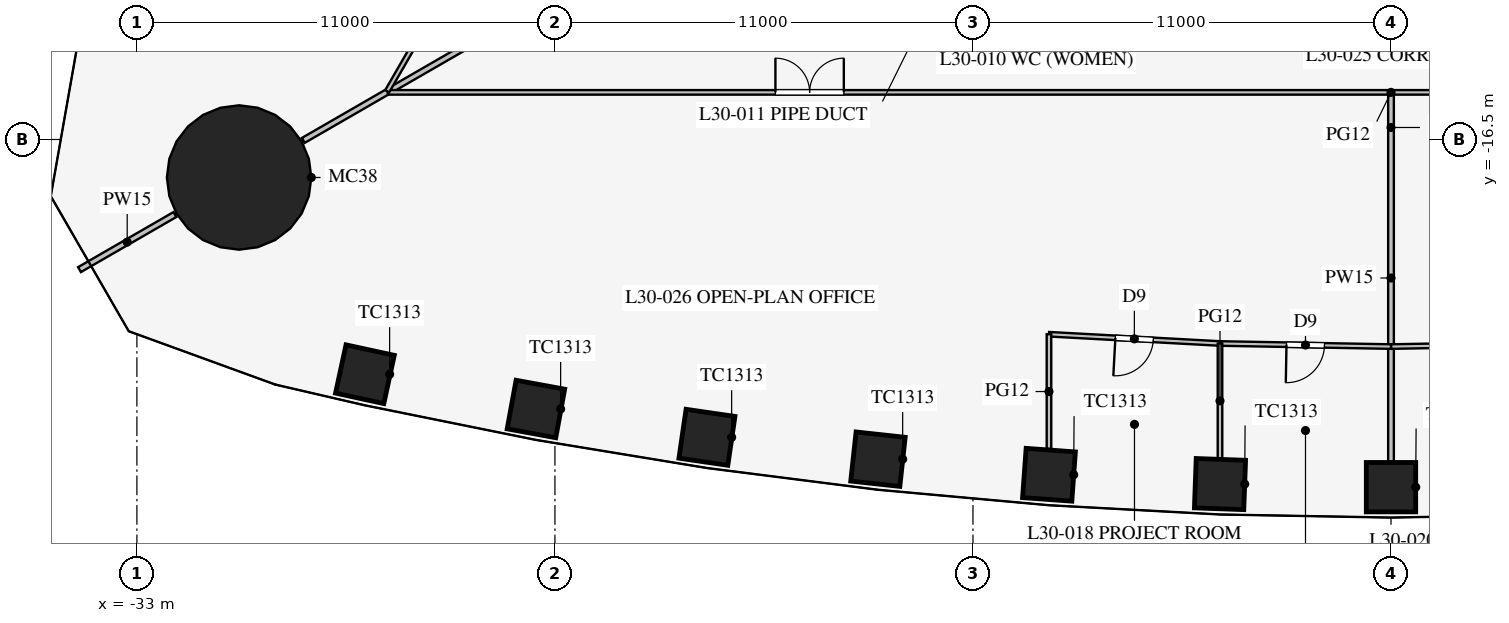
"""IFC4 building model, lengths in metres.
Left out: names, types, materials, properties, quantities, classifications, styles, units other than length and angle.
Written with IfcOpenShell. Run it as: python <this file> out.ifc"""

import sys

from ifc_helpers import new_model, si_unit, direction, frame, frame_2d, origin, origin_2d, place, context, subcontext, project, spatial, rectangle, circle, extrude, element, fill, save


model = new_model("IFC4")
c1 = context("Model", 3, precision=1e-05, world=origin(), true_north=direction((0.0, 1.0)))
c2 = subcontext(c1, "Body", "Model", "MODEL_VIEW")
j1 = project(units=[si_unit("LENGTHUNIT", "METRE"), si_unit("PLANEANGLEUNIT", "RADIAN")], contexts=[c1])
p1 = place(None, origin())
s1 = spatial("IfcSite", under=j1, at=p1, CompositionType="ELEMENT")
p2 = place(p1, origin())
s2 = spatial("IfcBuilding", under=s1, at=p2, CompositionType="ELEMENT")
p3 = place(p2, frame((0.0, 0.0, 132.5)))
s3 = spatial("IfcBuildingStorey", under=s2, at=p3, CompositionType="ELEMENT", Elevation=132.5)
for number, where, z_axis, x_axis in (
    (1, (-27.0, -22.677, 0.0), (0.0, 0.0, 1.0), (0.977, -0.212, 0.0)),
    (2, (-22.5, -23.593, 0.0), (0.0, 0.0, 1.0), (0.984, -0.18, 0.0)),
    (3, (-18.0, -24.337, 0.0), (0.0, 0.0, 1.0), (0.99, -0.144, 0.0)),
    (4, (-13.5, -24.913, 0.0), (0.0, 0.0, 1.0), (0.994, -0.108, 0.0)),
    (5, (-9.0, -25.323, 0.0), (0.0, 0.0, 1.0), (0.997, -0.072, 0.0)),
    (6, (-4.5, -25.568, 0.0), (0.0, 0.0, 1.0), (0.999, -0.036, 0.0)),
    (7, (0.0, -25.65, 0.0), (0.0, 0.0, 1.0), (1.0, 0.0, 0.0)),
):
    element("IfcColumn", number, at=place(p3, frame(where, z_axis=z_axis, x_axis=x_axis)), inside=s3, PredefinedType="COLUMN", context=c2, shape_type="SweptSolid", body=[
        extrude(rectangle(XDim=1.3, YDim=1.3, at=origin_2d()), origin(), (0.0, 0.0, 1.0), 4.2),
    ])
p4 = place(p3, frame((-30.311, -17.5, 0.0), z_axis=(0.0, 0.0, 1.0), x_axis=(1.0, 0.0, 0.0)))
e8 = element("IfcColumn", 8, at=p4, inside=s3, PredefinedType="COLUMN", context=c2, shape_type="SweptSolid", body=[
    extrude(circle(Radius=1.9, at=origin_2d()), origin(), (0.0, 0.0, 1.0), 4.2),
])
p5 = place(p3, frame((-14.203, -8.2, 0.0), z_axis=(0.0, 0.0, 1.0), x_axis=(-0.866024668836, -0.500001272966, 0.0)))
e9 = element("IfcWall", 9, at=p5, inside=s3, PredefinedType="PARTITIONING", context=c2, shape_type="SweptSolid", body=[
    extrude(rectangle(XDim=16.65, YDim=0.15, at=frame_2d((8.325, 0.0))), origin(), (0.0, 0.0, 1.0), 2.3),
])
p6 = place(p3, frame((-32.0, -18.475, 0.0), z_axis=(0.0, 0.0, 1.0), x_axis=(-0.866042548026, -0.499970304126, 0.0)))
e10 = element("IfcWall", 10, at=p6, inside=s3, PredefinedType="PARTITIONING", context=c2, shape_type="SweptSolid", body=[
    extrude(rectangle(XDim=2.899, YDim=0.15, at=frame_2d((1.45, 0.0))), origin(), (0.0, 0.0, 1.0), 2.3),
])
p7 = place(p3, frame((0.0, -15.32, 0.0), z_axis=(0.0, 0.0, 1.0), x_axis=(0.0, -1.0, 0.0)))
e11 = element("IfcWall", 11, at=p7, inside=s3, PredefinedType="PARTITIONING", context=c2, shape_type="SweptSolid", body=[
    extrude(rectangle(XDim=9.65, YDim=0.15, at=frame_2d((4.825, 0.0))), origin(), (0.0, 0.0, 1.0), 3.2),
])
p8 = place(p3, frame((-26.398, -15.26, 0.0), z_axis=(0.0, 0.0, 1.0), x_axis=(1.0, 0.0, 0.0)))
e12 = element("IfcWall", 12, at=p8, inside=s3, PredefinedType="PARTITIONING", context=c2, shape_type="SweptSolid", body=[
    extrude(rectangle(XDim=52.796, YDim=0.12, at=frame_2d((26.398, 0.0))), origin(), (0.0, 0.0, 1.0), 2.9),
])
p9 = place(p8, frame((10.2, 0.0, 0.15)))
e13 = element("IfcOpeningElement", 13, at=p9, cuts=e12, PredefinedType="OPENING", context=c2, shape_type="SweptSolid", body=[
    extrude(rectangle(XDim=1.8, YDim=2.1, at=frame_2d((0.9, 1.05))), frame((0.0, 0.07, 0.0), z_axis=(0.0, -1.0, 0.0), x_axis=(1.0, 0.0, 0.0)), (0.0, 0.0, 1.0), 0.14),
])
p10 = place(p8, frame((40.8, 0.0, 0.15)))
e14 = element("IfcOpeningElement", 14, at=p10, cuts=e12, PredefinedType="OPENING", context=c2, shape_type="SweptSolid", body=[
    extrude(rectangle(XDim=1.8, YDim=2.1, at=frame_2d((0.9, 1.05))), frame((0.0, 0.07, 0.0), z_axis=(0.0, -1.0, 0.0), x_axis=(1.0, 0.0, 0.0)), (0.0, 0.0, 1.0), 0.14),
])
p11 = place(p3, frame((0.0, -21.95, 0.0), z_axis=(0.0, 0.0, 1.0), x_axis=(0.999837820638, 0.018009231578, 0.0)))
e15 = element("IfcWall", 15, at=p11, inside=s3, PredefinedType="PARTITIONING", context=c2, shape_type="SweptSolid", body=[
    extrude(rectangle(XDim=4.501, YDim=0.12, at=frame_2d((2.25, 0.0))), origin(), (0.0, 0.0, 1.0), 2.9),
])
p12 = place(p11, frame((1.75, 0.0, 0.15)))
e16 = element("IfcOpeningElement", 16, at=p12, cuts=e15, PredefinedType="OPENING", context=c2, shape_type="SweptSolid", body=[
    extrude(rectangle(XDim=1.0, YDim=2.1, at=frame_2d((0.5, 1.05))), frame((0.0, 0.07, 0.0), z_axis=(0.0, -1.0, 0.0), x_axis=(1.0, 0.0, 0.0)), (0.0, 0.0, 1.0), 0.14),
])
p13 = place(p3, frame((-4.5, -21.869, 0.0), z_axis=(0.0, 0.0, 1.0), x_axis=(0.999837820638, -0.018009231578, 0.0)))
e17 = element("IfcWall", 17, at=p13, inside=s3, PredefinedType="PARTITIONING", context=c2, shape_type="SweptSolid", body=[
    extrude(rectangle(XDim=4.501, YDim=0.12, at=frame_2d((2.25, 0.0))), origin(), (0.0, 0.0, 1.0), 2.9),
])
p14 = place(p13, frame((1.75, 0.0, 0.15)))
e18 = element("IfcOpeningElement", 18, at=p14, cuts=e17, PredefinedType="OPENING", context=c2, shape_type="SweptSolid", body=[
    extrude(rectangle(XDim=1.0, YDim=2.1, at=frame_2d((0.5, 1.05))), frame((0.0, 0.07, 0.0), z_axis=(0.0, -1.0, 0.0), x_axis=(1.0, 0.0, 0.0)), (0.0, 0.0, 1.0), 0.14),
])
p15 = place(p3, frame((-9.0, -21.625, 0.0), z_axis=(0.0, 0.0, 1.0), x_axis=(0.998537376538, -0.054065771581, 0.0)))
e19 = element("IfcWall", 19, at=p15, inside=s3, PredefinedType="PARTITIONING", context=c2, shape_type="SweptSolid", body=[
    extrude(rectangle(XDim=4.507, YDim=0.12, at=frame_2d((2.253, 0.0))), origin(), (0.0, 0.0, 1.0), 2.9),
])
p16 = place(p15, frame((1.75, 0.0, 0.15)))
e20 = element("IfcOpeningElement", 20, at=p16, cuts=e19, PredefinedType="OPENING", context=c2, shape_type="SweptSolid", body=[
    extrude(rectangle(XDim=1.0, YDim=2.1, at=frame_2d((0.5, 1.05))), frame((0.0, 0.07, 0.0), z_axis=(0.0, -1.0, 0.0), x_axis=(1.0, 0.0, 0.0)), (0.0, 0.0, 1.0), 0.14),
])
p17 = place(p3, frame((-4.5, -21.869, 0.0), z_axis=(0.0, 0.0, 1.0), x_axis=(0.0, -1.0, 0.0)))
e21 = element("IfcWall", 21, at=p17, inside=s3, PredefinedType="PARTITIONING", context=c2, shape_type="SweptSolid", body=[
    extrude(rectangle(XDim=3.019, YDim=0.12, at=frame_2d((1.51, 0.0))), origin(), (0.0, 0.0, 1.0), 2.9),
])
p18 = place(p3, frame((-9.0, -21.625, 0.0), z_axis=(0.0, 0.0, 1.0), x_axis=(0.0, -1.0, 0.0)))
e22 = element("IfcWall", 22, at=p18, inside=s3, PredefinedType="PARTITIONING", context=c2, shape_type="SweptSolid", body=[
    extrude(rectangle(XDim=3.016, YDim=0.12, at=frame_2d((1.508, 0.0))), origin(), (0.0, 0.0, 1.0), 2.9),
])
p19 = place(p3, frame((26.415, -15.231, 0.0), z_axis=(0.0, 0.0, 1.0), x_axis=(-0.50000091641, 0.866024874695, 0.0)))
e23 = element("IfcWall", 23, at=p19, inside=s3, PredefinedType="PARTITIONING", context=c2, shape_type="SweptSolid", body=[
    extrude(rectangle(XDim=52.796, YDim=0.12, at=frame_2d((26.398, 0.0))), origin(), (0.0, 0.0, 1.0), 2.9),
])
p20 = place(p19, frame((10.2, 0.0, 0.15)))
e24 = element("IfcOpeningElement", 24, at=p20, cuts=e23, PredefinedType="OPENING", context=c2, shape_type="SweptSolid", body=[
    extrude(rectangle(XDim=1.8, YDim=2.1, at=frame_2d((0.9, 1.05))), frame((0.0, 0.07, 0.0), z_axis=(0.0, -1.0, 0.0), x_axis=(1.0, 0.0, 0.0)), (0.0, 0.0, 1.0), 0.14),
])
p21 = place(p19, frame((40.8, 0.0, 0.15)))
e25 = element("IfcOpeningElement", 25, at=p21, cuts=e23, PredefinedType="OPENING", context=c2, shape_type="SweptSolid", body=[
    extrude(rectangle(XDim=1.8, YDim=2.1, at=frame_2d((0.9, 1.05))), frame((0.0, 0.07, 0.0), z_axis=(0.0, -1.0, 0.0), x_axis=(1.0, 0.0, 0.0)), (0.0, 0.0, 1.0), 0.14),
])
p22 = place(p3, frame((-0.016, 30.491, 0.0), z_axis=(0.0, 0.0, 1.0), x_axis=(-0.50000091641, -0.866024874695, 0.0)))
e26 = element("IfcWall", 26, at=p22, inside=s3, PredefinedType="PARTITIONING", context=c2, shape_type="SweptSolid", body=[
    extrude(rectangle(XDim=52.796, YDim=0.12, at=frame_2d((26.398, 0.0))), origin(), (0.0, 0.0, 1.0), 2.9),
])
p23 = place(p22, frame((10.2, 0.0, 0.15)))
e27 = element("IfcOpeningElement", 27, at=p23, cuts=e26, PredefinedType="OPENING", context=c2, shape_type="SweptSolid", body=[
    extrude(rectangle(XDim=1.8, YDim=2.1, at=frame_2d((0.9, 1.05))), frame((0.0, 0.07, 0.0), z_axis=(0.0, -1.0, 0.0), x_axis=(1.0, 0.0, 0.0)), (0.0, 0.0, 1.0), 0.14),
])
p24 = place(p22, frame((40.8, 0.0, 0.15)))
e28 = element("IfcOpeningElement", 28, at=p24, cuts=e26, PredefinedType="OPENING", context=c2, shape_type="SweptSolid", body=[
    extrude(rectangle(XDim=1.8, YDim=2.1, at=frame_2d((0.9, 1.05))), frame((0.0, 0.07, 0.0), z_axis=(0.0, -1.0, 0.0), x_axis=(1.0, 0.0, 0.0)), (0.0, 0.0, 1.0), 0.14),
])
p25 = place(p16, frame((1.0, 0.0, 0.0), z_axis=(0.0, 0.0, 1.0), x_axis=(-1.0, 0.0, 0.0)))
e29 = element("IfcDoor", 29, at=p25, inside=s3, OperationType="SINGLE_SWING_RIGHT", PredefinedType="DOOR", context=c2, shape_type="SweptSolid", body=[
    extrude(rectangle(XDim=1.0, YDim=2.1, at=frame_2d((0.5, 1.05))), frame((0.0, 0.025, 0.0), z_axis=(0.0, -1.0, 0.0), x_axis=(1.0, 0.0, 0.0)), (0.0, 0.0, 1.0), 0.05),
])
fill(e20, e29)
p26 = place(p14, frame((1.0, 0.0, 0.0), z_axis=(0.0, 0.0, 1.0), x_axis=(-1.0, 0.0, 0.0)))
e30 = element("IfcDoor", 30, at=p26, inside=s3, OperationType="SINGLE_SWING_RIGHT", PredefinedType="DOOR", context=c2, shape_type="SweptSolid", body=[
    extrude(rectangle(XDim=1.0, YDim=2.1, at=frame_2d((0.5, 1.05))), frame((0.0, 0.025, 0.0), z_axis=(0.0, -1.0, 0.0), x_axis=(1.0, 0.0, 0.0)), (0.0, 0.0, 1.0), 0.05),
])
fill(e18, e30)
p27 = place(p9, origin())
e31 = element("IfcDoor", 31, at=p27, inside=s3, OperationType="DOUBLE_DOOR_SINGLE_SWING", PredefinedType="DOOR", context=c2, shape_type="SweptSolid", body=[
    extrude(rectangle(XDim=1.8, YDim=2.1, at=frame_2d((0.9, 1.05))), frame((0.0, 0.025, 0.0), z_axis=(0.0, -1.0, 0.0), x_axis=(1.0, 0.0, 0.0)), (0.0, 0.0, 1.0), 0.05),
])
fill(e13, e31)
save(model, sys.argv[1])
